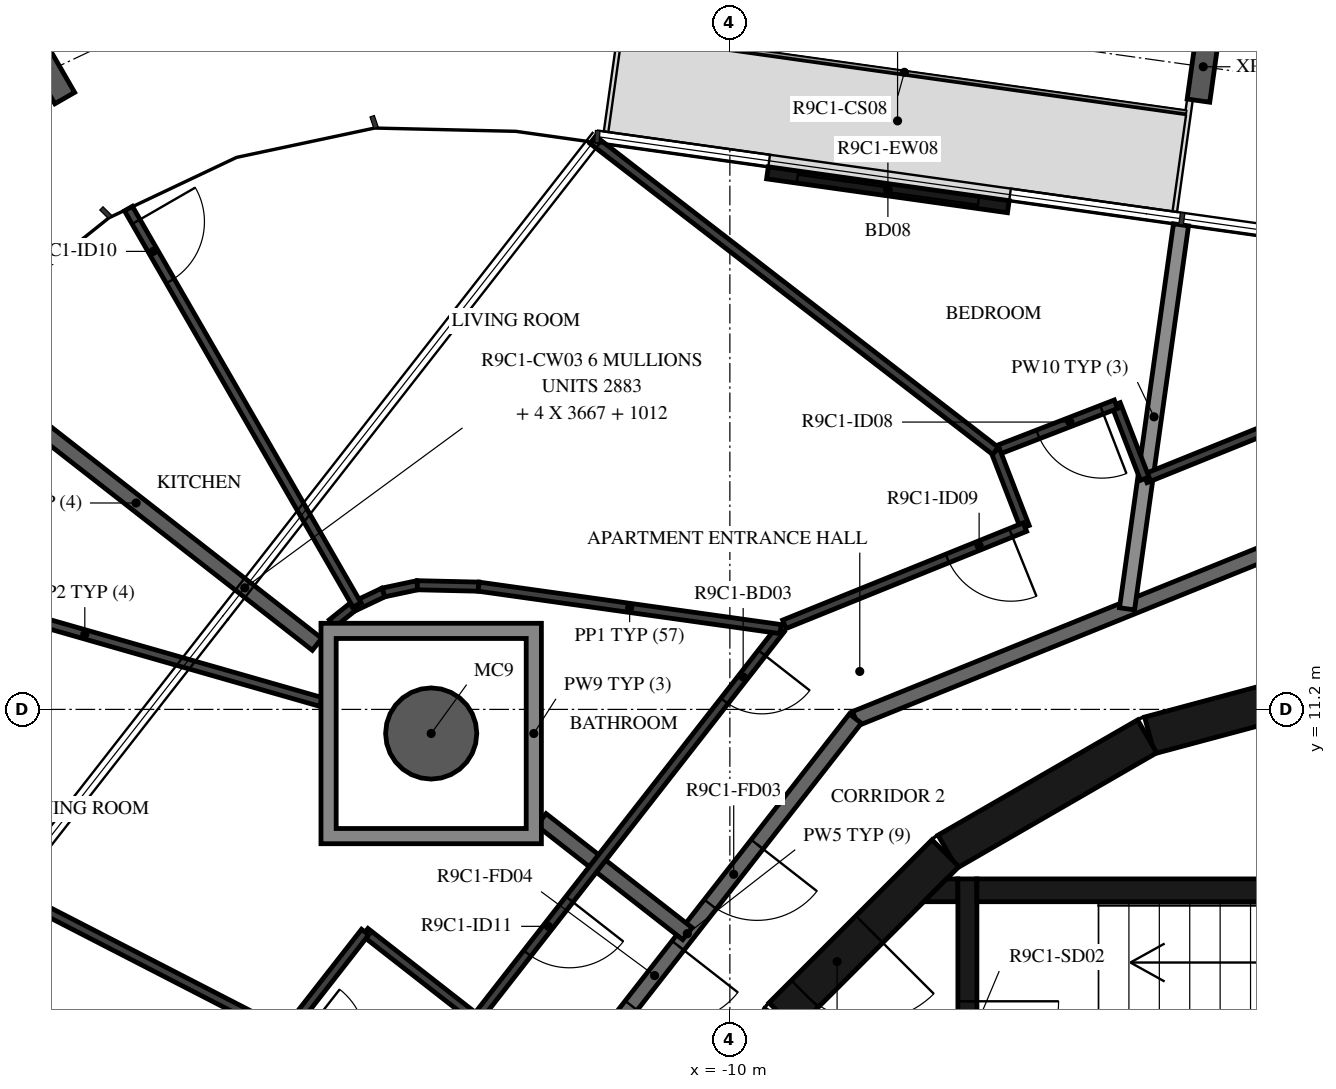
"""IFC4 building model, lengths in metres.
Left out: names, types, materials, properties, quantities, classifications, styles, units other than length and angle.
Written with IfcOpenShell. Run it as: python <this file> out.ifc"""

import sys

from ifc_helpers import new_model, si_unit, direction, frame, frame_2d, origin, origin_2d, place, context, subcontext, project, spatial, polyline, rectangle, hollow_circle, i_section, outline, extrude, element, fill, save


model = new_model("IFC4")
c1 = context("Model", 3, precision=1e-05, world=origin(), true_north=direction((0.0, 1.0)))
c2 = subcontext(c1, "Body", "Model", "MODEL_VIEW")
j1 = project(units=[si_unit("LENGTHUNIT", "METRE"), si_unit("PLANEANGLEUNIT", "RADIAN")], contexts=[c1])
p1 = place(None, origin())
s1 = spatial("IfcSite", under=j1, at=p1, CompositionType="ELEMENT")
p2 = place(p1, origin())
s2 = spatial("IfcBuilding", under=s1, at=p2, CompositionType="ELEMENT")
p3 = place(p2, frame((0.0, 0.0, 357.5)))
s3 = spatial("IfcBuildingStorey", under=s2, at=p3, CompositionType="ELEMENT", Elevation=357.5)
p4 = place(p3, frame((-13.929, 10.883, -0.38), z_axis=(0.0, 0.0, 1.0), x_axis=(1.0, 0.0, 0.0)))
e1 = element("IfcColumn", 1, at=p4, inside=s3, PredefinedType="COLUMN", context=c2, shape_type="SweptSolid", body=[
    extrude(hollow_circle(Radius=0.6, WallThickness=0.03, at=origin_2d()), origin(), (0.0, 0.0, 1.0), 3.5),
])
for number, where, z_axis, x_axis in (
    (2, (-3.773, 19.655, -0.38), (0.0, 0.0, 1.0), (0.99, -0.139, 0.0)),
    (3, (-18.976, 19.632, -0.38), (0.0, 0.0, 1.0), (0.866, 0.5, 0.0)),
):
    element("IfcColumn", number, at=place(p3, frame(where, z_axis=z_axis, x_axis=x_axis)), inside=s3, PredefinedType="COLUMN", context=c2, shape_type="SweptSolid", body=[
        extrude(i_section(OverallWidth=0.3, OverallDepth=0.9, WebThickness=0.019, FlangeThickness=0.035, FilletRadius=0.03, at=origin_2d()), origin(), (0.0, 0.0, 1.0), 3.5),
    ])
p5 = place(p3, frame((-6.337, 17.814, 0.0), z_axis=(0.0, 0.0, 1.0), x_axis=(-0.99026890462, 0.13916715325, 0.0)))
e4 = element("IfcWall", 4, at=p5, inside=s3, PredefinedType="STANDARD", context=c2, shape_type="SweptSolid", body=[
    extrude(rectangle(XDim=3.2, YDim=0.16, at=frame_2d((1.6, 0.0))), origin(), (0.0, 0.0, 1.0), 3.12),
])
p6 = place(p5, frame((0.4, 0.0, 0.0)))
e5 = element("IfcOpeningElement", 5, at=p6, cuts=e4, PredefinedType="OPENING", context=c2, shape_type="SweptSolid", body=[
    extrude(rectangle(XDim=2.4, YDim=2.4, at=frame_2d((1.2, 1.2))), frame((0.0, 0.09, 0.0), z_axis=(0.0, -1.0, 0.0), x_axis=(1.0, 0.0, 0.0)), (0.0, 0.0, 1.0), 0.18),
])
for number, where, z_axis, x_axis in (
    (6, (-1.55, 11.643, 0.0), (0.0, 0.0, 1.0), (-0.966, -0.259, 0.0)),
    (7, (-4.51, 10.845, 0.0), (0.0, 0.0, 1.0), (-0.866, -0.5, 0.0)),
):
    element("IfcWall", number, at=place(p3, frame(where, z_axis=z_axis, x_axis=x_axis)), inside=s3, PredefinedType="SHEAR", context=c2, shape_type="SweptSolid", body=[
        extrude(rectangle(XDim=3.033, YDim=0.5, at=frame_2d((1.516, 0.0))), origin(), (0.0, 0.0, 1.0), 3.12),
    ])
p7 = place(p3, frame((-7.164, 9.308, 0.0), z_axis=(0.0, 0.0, 1.0), x_axis=(-0.707106781187, -0.707106781187, 0.0)))
e8 = element("IfcWall", 8, at=p7, inside=s3, PredefinedType="SHEAR", context=c2, shape_type="SweptSolid", body=[
    extrude(rectangle(XDim=3.032, YDim=0.5, at=frame_2d((1.516, 0.0))), origin(), (0.0, 0.0, 1.0), 3.12),
])
p8 = place(p7, frame((1.416, 0.0, 0.0)))
e9 = element("IfcOpeningElement", 9, at=p8, cuts=e8, PredefinedType="OPENING", context=c2, shape_type="SweptSolid", body=[
    extrude(rectangle(XDim=1.2, YDim=2.1, at=frame_2d((0.6, 1.05))), frame((0.0, 0.26, 0.0), z_axis=(0.0, -1.0, 0.0), x_axis=(1.0, 0.0, 0.0)), (0.0, 0.0, 1.0), 0.52),
])
p9 = place(p3, frame((-9.329, 7.137, 0.0), z_axis=(0.0, 0.0, 1.0), x_axis=(-0.500087131594, -0.865975092491, 0.0)))
e10 = element("IfcWall", 10, at=p9, inside=s3, PredefinedType="SHEAR", context=c2, shape_type="SweptSolid", body=[
    extrude(rectangle(XDim=3.033, YDim=0.5, at=frame_2d((1.516, 0.0))), origin(), (0.0, 0.0, 1.0), 3.12),
])
p10 = place(p3, frame((-6.75, 8.82, 0.0), z_axis=(0.0, 0.0, 1.0), x_axis=(1.0, 0.0, 0.0)))
e11 = element("IfcWall", 11, at=p10, inside=s3, PredefinedType="SHEAR", context=c2, shape_type="SweptSolid", body=[
    extrude(rectangle(XDim=6.75, YDim=0.3, at=frame_2d((3.375, 0.0))), origin(), (0.0, 0.0, 1.0), 3.12),
])
p11 = place(p3, frame((-6.875, 8.97, 0.0), z_axis=(0.0, 0.0, 1.0), x_axis=(0.0, -1.0, 0.0)))
e12 = element("IfcWall", 12, at=p11, inside=s3, PredefinedType="SHEAR", context=c2, shape_type="SweptSolid", body=[
    extrude(rectangle(XDim=3.92, YDim=0.25, at=frame_2d((1.96, 0.0))), origin(), (0.0, 0.0, 1.0), 3.12),
])
p12 = place(p11, frame((1.61, 0.0, 0.0)))
e13 = element("IfcOpeningElement", 13, at=p12, cuts=e12, PredefinedType="OPENING", context=c2, shape_type="SweptSolid", body=[
    extrude(rectangle(XDim=1.2, YDim=2.1, at=frame_2d((0.6, 1.05))), frame((0.0, 0.135, 0.0), z_axis=(0.0, -1.0, 0.0), x_axis=(1.0, 0.0, 0.0)), (0.0, 0.0, 1.0), 0.27),
])
p13 = place(p3, origin())
e14 = element("IfcWall", 14, at=p13, inside=s3, PredefinedType="SHEAR", context=c2, shape_type="SweptSolid", body=[
    extrude(outline(polyline([(-7.148, 8.97), (-7.0, 8.97), (-7.0, 8.67), (-7.448, 8.67), (-7.148, 8.97)])), origin(), (0.0, 0.0, 1.0), 3.12),
])
p14 = place(p3, frame((-1.691, 13.769, 0.0), z_axis=(0.0, 0.0, 1.0), x_axis=(-0.92717916932, -0.374618189599, 0.0)))
e15 = element("IfcWall", 15, at=p14, inside=s3, PredefinedType="STANDARD", context=c2, shape_type="SweptSolid", body=[
    extrude(rectangle(XDim=7.181, YDim=0.2, at=frame_2d((3.591, 0.0))), origin(), (0.0, 0.0, 1.0), 3.12),
])
p15 = place(p3, frame((-8.349, 11.079, 0.0), z_axis=(0.0, 0.0, 1.0), x_axis=(-0.615669112324, -0.78800478687, 0.0)))
e16 = element("IfcWall", 16, at=p15, inside=s3, PredefinedType="STANDARD", context=c2, shape_type="SweptSolid", body=[
    extrude(rectangle(XDim=7.181, YDim=0.2, at=frame_2d((3.591, 0.0))), origin(), (0.0, 0.0, 1.0), 3.12),
])
p16 = place(p15, frame((2.1, 0.0, 0.0)))
e17 = element("IfcOpeningElement", 17, at=p16, cuts=e16, PredefinedType="OPENING", context=c2, shape_type="SweptSolid", body=[
    extrude(rectangle(XDim=1.0, YDim=2.1, at=frame_2d((0.5, 1.05))), frame((0.0, 0.11, 0.0), z_axis=(0.0, -1.0, 0.0), x_axis=(1.0, 0.0, 0.0)), (0.0, 0.0, 1.0), 0.22),
])
p17 = place(p15, frame((3.79, 0.0, 0.0)))
e18 = element("IfcOpeningElement", 18, at=p17, cuts=e16, PredefinedType="OPENING", context=c2, shape_type="SweptSolid", body=[
    extrude(rectangle(XDim=1.0, YDim=2.1, at=frame_2d((0.5, 1.05))), frame((0.0, 0.11, 0.0), z_axis=(0.0, -1.0, 0.0), x_axis=(1.0, 0.0, 0.0)), (0.0, 0.0, 1.0), 0.22),
])
p18 = place(p3, frame((-4.065, 17.575, 0.0), z_axis=(0.0, 0.0, 1.0), x_axis=(-0.139163175955, -0.990269463559, 0.0)))
e19 = element("IfcWall", 19, at=p18, inside=s3, PredefinedType="STANDARD", context=c2, shape_type="SweptSolid", body=[
    extrude(rectangle(XDim=5.102, YDim=0.2, at=frame_2d((2.551, 0.0))), origin(), (0.0, 0.0, 1.0), 2.73),
])
p19 = place(p3, frame((-12.479, 9.75, 0.0), z_axis=(0.0, 0.0, 1.0), x_axis=(0.788050197026, -0.615610986717, 0.0)))
e20 = element("IfcWall", 20, at=p19, inside=s3, PredefinedType="STANDARD", context=c2, shape_type="SweptSolid", body=[
    extrude(rectangle(XDim=2.437, YDim=0.2, at=frame_2d((1.218, 0.0))), origin(), (0.0, 0.0, 1.0), 3.12),
])
p20 = place(p3, frame((-20.191, 15.775, 0.0), z_axis=(0.0, 0.0, 1.0), x_axis=(0.788013955741, -0.615657376758, 0.0)))
e21 = element("IfcWall", 21, at=p20, inside=s3, PredefinedType="STANDARD", context=c2, shape_type="SweptSolid", body=[
    extrude(rectangle(XDim=6.04, YDim=0.2, at=frame_2d((3.02, 0.0))), origin(), (0.0, 0.0, 1.0), 3.12),
])
p21 = place(p3, frame((-1.88, 15.311, 0.0), z_axis=(0.0, 0.0, 1.0), x_axis=(-0.927176894493, -0.374623819743, 0.0)))
e22 = element("IfcWall", 22, at=p21, inside=s3, PredefinedType="PARTITIONING", context=c2, shape_type="SweptSolid", body=[
    extrude(rectangle(XDim=2.862, YDim=0.12, at=frame_2d((1.431, 0.0))), origin(), (0.0, 0.0, 1.0), 3.12),
])
p22 = place(p3, frame((-4.542, 14.235, 0.0), z_axis=(0.0, 0.0, 1.0), x_axis=(-0.360785401119, 0.932648859078, 0.0)))
e23 = element("IfcWall", 23, at=p22, inside=s3, PredefinedType="PARTITIONING", context=c2, shape_type="SweptSolid", body=[
    extrude(rectangle(XDim=1.05, YDim=0.12, at=frame_2d((0.525, 0.0))), origin(), (0.0, 0.0, 1.0), 3.12),
])
p23 = place(p3, frame((-4.921, 15.215, 0.0), z_axis=(0.0, 0.0, 1.0), x_axis=(-0.93265541153, -0.360768462236, 0.0)))
e24 = element("IfcWall", 24, at=p23, inside=s3, PredefinedType="PARTITIONING", context=c2, shape_type="SweptSolid", body=[
    extrude(rectangle(XDim=1.7, YDim=0.12, at=frame_2d((0.85, 0.0))), origin(), (0.0, 0.0, 1.0), 3.12),
])
p24 = place(p23, frame((0.2, 0.0, 0.0)))
e25 = element("IfcOpeningElement", 25, at=p24, cuts=e24, PredefinedType="OPENING", context=c2, shape_type="SweptSolid", body=[
    extrude(rectangle(XDim=0.9, YDim=2.1, at=frame_2d((0.45, 1.05))), frame((0.0, 0.07, 0.0), z_axis=(0.0, -1.0, 0.0), x_axis=(1.0, 0.0, 0.0)), (0.0, 0.0, 1.0), 0.14),
])
p25 = place(p3, frame((-6.506, 14.601, 0.0), z_axis=(0.0, 0.0, 1.0), x_axis=(0.36075842677, -0.932659293373, 0.0)))
e26 = element("IfcWall", 26, at=p25, inside=s3, PredefinedType="PARTITIONING", context=c2, shape_type="SweptSolid", body=[
    extrude(rectangle(XDim=1.075, YDim=0.12, at=frame_2d((0.538, 0.0))), origin(), (0.0, 0.0, 1.0), 3.12),
])
p26 = place(p3, frame((-6.118, 13.598, 0.0), z_axis=(0.0, 0.0, 1.0), x_axis=(-0.927163982911, -0.374655773735, 0.0)))
e27 = element("IfcWall", 27, at=p26, inside=s3, PredefinedType="PARTITIONING", context=c2, shape_type="SweptSolid", body=[
    extrude(rectangle(XDim=3.414, YDim=0.12, at=frame_2d((1.707, 0.0))), origin(), (0.0, 0.0, 1.0), 3.12),
])
p27 = place(p26, frame((0.2, 0.0, 0.0)))
e28 = element("IfcOpeningElement", 28, at=p27, cuts=e27, PredefinedType="OPENING", context=c2, shape_type="SweptSolid", body=[
    extrude(rectangle(XDim=0.9, YDim=2.1, at=frame_2d((0.45, 1.05))), frame((0.0, 0.07, 0.0), z_axis=(0.0, -1.0, 0.0), x_axis=(1.0, 0.0, 0.0)), (0.0, 0.0, 1.0), 0.14),
])
p28 = place(p3, frame((-9.333, 12.257, 0.0), z_axis=(0.0, 0.0, 1.0), x_axis=(-0.615643313808, -0.788024942602, 0.0)))
e29 = element("IfcWall", 29, at=p28, inside=s3, PredefinedType="PARTITIONING", context=c2, shape_type="SweptSolid", body=[
    extrude(rectangle(XDim=6.506, YDim=0.12, at=frame_2d((3.253, 0.0))), origin(), (0.0, 0.0, 1.0), 3.12),
])
p29 = place(p28, frame((0.4, 0.0, 0.0)))
e30 = element("IfcOpeningElement", 30, at=p29, cuts=e29, PredefinedType="OPENING", context=c2, shape_type="SweptSolid", body=[
    extrude(rectangle(XDim=0.8, YDim=2.1, at=frame_2d((0.4, 1.05))), frame((0.0, 0.07, 0.0), z_axis=(0.0, -1.0, 0.0), x_axis=(1.0, 0.0, 0.0)), (0.0, 0.0, 1.0), 0.14),
])
p30 = place(p28, frame((4.512, 0.0, 0.0)))
e31 = element("IfcOpeningElement", 31, at=p30, cuts=e29, PredefinedType="OPENING", context=c2, shape_type="SweptSolid", body=[
    extrude(rectangle(XDim=0.9, YDim=2.1, at=frame_2d((0.45, 1.05))), frame((0.0, 0.07, 0.0), z_axis=(0.0, -1.0, 0.0), x_axis=(1.0, 0.0, 0.0)), (0.0, 0.0, 1.0), 0.14),
])
p31 = place(p3, frame((-11.803, 18.693, 0.0), z_axis=(0.0, 0.0, 1.0), x_axis=(0.791388468332, -0.611313579262, 0.0)))
e32 = element("IfcWall", 32, at=p31, inside=s3, PredefinedType="PARTITIONING", context=c2, shape_type="SweptSolid", body=[
    extrude(rectangle(XDim=6.693, YDim=0.12, at=frame_2d((3.347, 0.0))), origin(), (0.0, 0.0, 1.0), 3.12),
])
p32 = place(p3, frame((-14.941, 12.557, 0.0), z_axis=(0.0, 0.0, 1.0), x_axis=(0.903749522455, 0.428061678572, 0.0)))
e33 = element("IfcWall", 33, at=p32, inside=s3, PredefinedType="PARTITIONING", context=c2, shape_type="SweptSolid", body=[
    extrude(rectangle(XDim=0.426, YDim=0.12, at=frame_2d((0.213, 0.0))), origin(), (0.0, 0.0, 1.0), 3.12),
])
p33 = place(p3, frame((-14.557, 12.739, 0.0), z_axis=(0.0, 0.0, 1.0), x_axis=(0.978201106396, 0.207659807008, 0.0)))
e34 = element("IfcWall", 34, at=p33, inside=s3, PredefinedType="PARTITIONING", context=c2, shape_type="SweptSolid", body=[
    extrude(rectangle(XDim=0.455, YDim=0.12, at=frame_2d((0.228, 0.0))), origin(), (0.0, 0.0, 1.0), 3.12),
])
p34 = place(p3, frame((-14.112, 12.833, 0.0), z_axis=(0.0, 0.0, 1.0), x_axis=(0.999735389157, -0.023003296874, 0.0)))
e35 = element("IfcWall", 35, at=p34, inside=s3, PredefinedType="PARTITIONING", context=c2, shape_type="SweptSolid", body=[
    extrude(rectangle(XDim=0.807, YDim=0.12, at=frame_2d((0.403, 0.0))), origin(), (0.0, 0.0, 1.0), 3.12),
])
p35 = place(p3, frame((-13.305, 12.815, 0.0), z_axis=(0.0, 0.0, 1.0), x_axis=(0.990267066123, -0.139180234773, 0.0)))
e36 = element("IfcWall", 36, at=p35, inside=s3, PredefinedType="PARTITIONING", context=c2, shape_type="SweptSolid", body=[
    extrude(rectangle(XDim=4.012, YDim=0.12, at=frame_2d((2.006, 0.0))), origin(), (0.0, 0.0, 1.0), 3.12),
])
p36 = place(p3, frame((-17.912, 17.789, 0.0), z_axis=(0.0, 0.0, 1.0), x_axis=(0.499615949423, -0.866247021976, 0.0)))
e37 = element("IfcWall", 37, at=p36, inside=s3, PredefinedType="PARTITIONING", context=c2, shape_type="SweptSolid", body=[
    extrude(rectangle(XDim=6.02, YDim=0.12, at=frame_2d((3.01, 0.0))), origin(), (0.0, 0.0, 1.0), 2.73),
])
p37 = place(p36, frame((0.2, 0.0, 0.0)))
e38 = element("IfcOpeningElement", 38, at=p37, cuts=e37, PredefinedType="OPENING", context=c2, shape_type="SweptSolid", body=[
    extrude(rectangle(XDim=0.9, YDim=2.1, at=frame_2d((0.45, 1.05))), frame((0.0, 0.07, 0.0), z_axis=(0.0, -1.0, 0.0), x_axis=(1.0, 0.0, 0.0)), (0.0, 0.0, 1.0), 0.14),
])
p38 = place(p3, frame((-14.968, 12.544, 0.0), z_axis=(0.0, 0.0, 1.0), x_axis=(-0.780727997402, -0.62487102195, 0.0)))
e39 = element("IfcWall", 39, at=p38, inside=s3, PredefinedType="PARTITIONING", context=c2, shape_type="SweptSolid", body=[
    extrude(rectangle(XDim=0.338, YDim=0.12, at=frame_2d((0.169, 0.0))), origin(), (0.0, 0.0, 1.0), 3.12),
])
p39 = place(p3, frame((-13.338, 7.129, 0.0), z_axis=(0.0, 0.0, 1.0), x_axis=(-0.787938483233, 0.615753965997, 0.0)))
e40 = element("IfcWall", 40, at=p39, inside=s3, PredefinedType="PARTITIONING", context=c2, shape_type="SweptSolid", body=[
    extrude(rectangle(XDim=1.853, YDim=0.12, at=frame_2d((0.927, 0.0))), origin(), (0.0, 0.0, 1.0), 3.12),
])
p40 = place(p3, frame((-14.798, 8.271, 0.0), z_axis=(0.0, 0.0, 1.0), x_axis=(-0.615669123866, -0.788004777852, 0.0)))
e41 = element("IfcWall", 41, at=p40, inside=s3, PredefinedType="PARTITIONING", context=c2, shape_type="SweptSolid", body=[
    extrude(rectangle(XDim=1.7, YDim=0.12, at=frame_2d((0.85, 0.0))), origin(), (0.0, 0.0, 1.0), 3.12),
])
p41 = place(p3, frame((-21.594, 13.077, 0.0), z_axis=(0.0, 0.0, 1.0), x_axis=(0.961389857774, -0.275190009576, 0.0)))
e42 = element("IfcWall", 42, at=p41, inside=s3, PredefinedType="PARTITIONING", context=c2, shape_type="SweptSolid", body=[
    extrude(rectangle(XDim=6.464, YDim=0.12, at=frame_2d((3.232, 0.0))), origin(), (0.0, 0.0, 1.0), 2.73),
])
p42 = place(p41, frame((0.2, 0.0, 0.0)))
e43 = element("IfcOpeningElement", 43, at=p42, cuts=e42, PredefinedType="OPENING", context=c2, shape_type="SweptSolid", body=[
    extrude(rectangle(XDim=0.9, YDim=2.1, at=frame_2d((0.45, 1.05))), frame((0.0, 0.07, 0.0), z_axis=(0.0, -1.0, 0.0), x_axis=(1.0, 0.0, 0.0)), (0.0, 0.0, 1.0), 0.14),
])
p43 = place(p3, frame((-21.85, 10.021, 0.0), z_axis=(0.0, 0.0, 1.0), x_axis=(0.889153763622, -0.457608549567, 0.0)))
e44 = element("IfcWall", 44, at=p43, inside=s3, PredefinedType="PARTITIONING", context=c2, shape_type="SweptSolid", body=[
    extrude(rectangle(XDim=6.754, YDim=0.12, at=frame_2d((3.377, 0.0))), origin(), (0.0, 0.0, 1.0), 3.12),
])
p44 = place(p3, origin())
e45 = element("IfcWall", 45, at=p44, inside=s3, PredefinedType="STANDARD", context=c2, shape_type="SweptSolid", body=[
    extrude(outline(polyline([(-12.479, 12.333), (-12.479, 9.433), (-15.379, 9.433), (-15.379, 12.333), (-12.479, 12.333)]), holes=[polyline([(-15.179, 9.633), (-12.679, 9.633), (-12.679, 12.133), (-15.179, 12.133), (-15.179, 9.633)])]), origin(), (0.0, 0.0, 1.0), 3.12),
])
p45 = place(p6, origin())
e46 = element("IfcDoor", 46, at=p45, inside=s3, OperationType="DOUBLE_DOOR_SLIDING", PredefinedType="DOOR", context=c2, shape_type="SweptSolid", body=[
    extrude(rectangle(XDim=2.4, YDim=2.4, at=frame_2d((1.2, 1.2))), frame((0.0, 0.025, 0.0), z_axis=(0.0, -1.0, 0.0), x_axis=(1.0, 0.0, 0.0)), (0.0, 0.0, 1.0), 0.05),
])
fill(e5, e46)
p46 = place(p12, origin())
e47 = element("IfcDoor", 47, at=p46, inside=s3, OperationType="SINGLE_SWING_LEFT", PredefinedType="DOOR", context=c2, shape_type="SweptSolid", body=[
    extrude(rectangle(XDim=1.2, YDim=2.1, at=frame_2d((0.6, 1.05))), frame((0.0, 0.025, 0.0), z_axis=(0.0, -1.0, 0.0), x_axis=(1.0, 0.0, 0.0)), (0.0, 0.0, 1.0), 0.05),
])
fill(e13, e47)
p47 = place(p8, origin())
e48 = element("IfcDoor", 48, at=p47, inside=s3, OperationType="SINGLE_SWING_RIGHT", PredefinedType="DOOR", context=c2, shape_type="SweptSolid", body=[
    extrude(rectangle(XDim=1.2, YDim=2.1, at=frame_2d((0.6, 1.05))), frame((0.0, 0.025, 0.0), z_axis=(0.0, -1.0, 0.0), x_axis=(1.0, 0.0, 0.0)), (0.0, 0.0, 1.0), 0.05),
])
fill(e9, e48)
p48 = place(p16, origin())
e49 = element("IfcDoor", 49, at=p48, inside=s3, OperationType="SINGLE_SWING_RIGHT", PredefinedType="DOOR", context=c2, shape_type="SweptSolid", body=[
    extrude(rectangle(XDim=1.0, YDim=2.1, at=frame_2d((0.5, 1.05))), frame((0.0, 0.025, 0.0), z_axis=(0.0, -1.0, 0.0), x_axis=(1.0, 0.0, 0.0)), (0.0, 0.0, 1.0), 0.05),
])
fill(e17, e49)
p49 = place(p24, origin())
e50 = element("IfcDoor", 50, at=p49, inside=s3, OperationType="SINGLE_SWING_RIGHT", PredefinedType="DOOR", context=c2, shape_type="SweptSolid", body=[
    extrude(rectangle(XDim=0.9, YDim=2.1, at=frame_2d((0.45, 1.05))), frame((0.0, 0.025, 0.0), z_axis=(0.0, -1.0, 0.0), x_axis=(1.0, 0.0, 0.0)), (0.0, 0.0, 1.0), 0.05),
])
fill(e25, e50)
p50 = place(p27, origin())
e51 = element("IfcDoor", 51, at=p50, inside=s3, OperationType="SINGLE_SWING_RIGHT", PredefinedType="DOOR", context=c2, shape_type="SweptSolid", body=[
    extrude(rectangle(XDim=0.9, YDim=2.1, at=frame_2d((0.45, 1.05))), frame((0.0, 0.025, 0.0), z_axis=(0.0, -1.0, 0.0), x_axis=(1.0, 0.0, 0.0)), (0.0, 0.0, 1.0), 0.05),
])
fill(e28, e51)
p51 = place(p29, origin())
e52 = element("IfcDoor", 52, at=p51, inside=s3, OperationType="SINGLE_SWING_RIGHT", PredefinedType="DOOR", context=c2, shape_type="SweptSolid", body=[
    extrude(rectangle(XDim=0.8, YDim=2.1, at=frame_2d((0.4, 1.05))), frame((0.0, 0.025, 0.0), z_axis=(0.0, -1.0, 0.0), x_axis=(1.0, 0.0, 0.0)), (0.0, 0.0, 1.0), 0.05),
])
fill(e30, e52)
p52 = place(p37, origin())
e53 = element("IfcDoor", 53, at=p52, inside=s3, OperationType="SINGLE_SWING_RIGHT", PredefinedType="DOOR", context=c2, shape_type="SweptSolid", body=[
    extrude(rectangle(XDim=0.9, YDim=2.1, at=frame_2d((0.45, 1.05))), frame((0.0, 0.025, 0.0), z_axis=(0.0, -1.0, 0.0), x_axis=(1.0, 0.0, 0.0)), (0.0, 0.0, 1.0), 0.05),
])
fill(e38, e53)
p53 = place(p17, origin())
e54 = element("IfcDoor", 54, at=p53, inside=s3, OperationType="SINGLE_SWING_LEFT", PredefinedType="DOOR", context=c2, shape_type="SweptSolid", body=[
    extrude(rectangle(XDim=1.0, YDim=2.1, at=frame_2d((0.5, 1.05))), frame((0.0, 0.025, 0.0), z_axis=(0.0, -1.0, 0.0), x_axis=(1.0, 0.0, 0.0)), (0.0, 0.0, 1.0), 0.05),
])
fill(e18, e54)
p54 = place(p30, origin())
e55 = element("IfcDoor", 55, at=p54, inside=s3, OperationType="SINGLE_SWING_LEFT", PredefinedType="DOOR", context=c2, shape_type="SweptSolid", body=[
    extrude(rectangle(XDim=0.9, YDim=2.1, at=frame_2d((0.45, 1.05))), frame((0.0, 0.025, 0.0), z_axis=(0.0, -1.0, 0.0), x_axis=(1.0, 0.0, 0.0)), (0.0, 0.0, 1.0), 0.05),
])
fill(e31, e55)
save(model, sys.argv[1])
